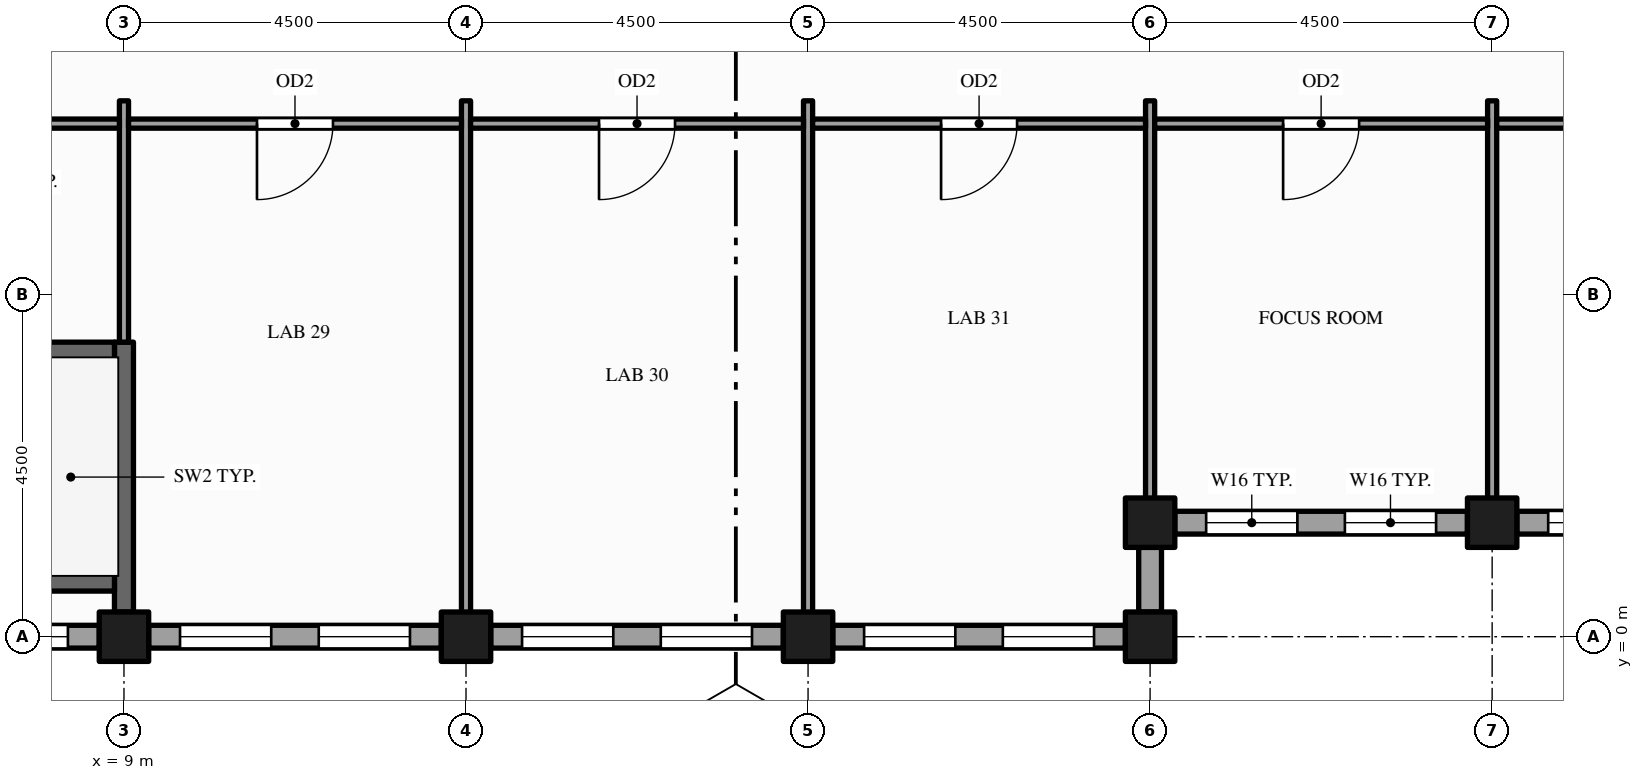
"""IFC4 building model, lengths in metres.
Left out: names, types, materials, properties, quantities, classifications, styles, units other than length and angle.
Written with IfcOpenShell. Run it as: python <this file> out.ifc"""

import sys

from ifc_helpers import new_model, si_unit, direction, frame, frame_2d, origin, origin_2d, place, context, subcontext, project, spatial, rectangle, hollow_rectangle, extrude, element, fill, save


model = new_model("IFC4")
c1 = context("Model", 3, precision=1e-05, world=origin(), true_north=direction((0.0, 1.0)))
c2 = subcontext(c1, "Body", "Model", "MODEL_VIEW")
j1 = project(units=[si_unit("LENGTHUNIT", "METRE"), si_unit("PLANEANGLEUNIT", "RADIAN")], contexts=[c1])
p1 = place(None, origin())
s1 = spatial("IfcSite", under=j1, at=p1, CompositionType="ELEMENT")
p2 = place(p1, origin())
s2 = spatial("IfcBuilding", under=s1, at=p2, CompositionType="ELEMENT")
p3 = place(p2, frame((0.0, 0.0, 269.0)))
s3 = spatial("IfcBuildingStorey", under=s2, at=p3, CompositionType="ELEMENT", Elevation=269.0)
for number, where, z_axis, x_axis in (
    (1, (9.0, 0.0, -0.15), (0.0, 0.0, 1.0), (1.0, 0.0, 0.0)),
    (2, (13.5, 0.0, -0.15), (0.0, 0.0, 1.0), (1.0, 0.0, 0.0)),
    (3, (18.0, 0.0, -0.15), (0.0, 0.0, 1.0), (1.0, 0.0, 0.0)),
    (4, (22.5, 0.0, -0.15), (0.0, 0.0, 1.0), (1.0, 0.0, 0.0)),
    (5, (22.5, 1.5, -0.15), (0.0, 0.0, 1.0), (1.0, 0.0, 0.0)),
    (6, (27.0, 1.5, -0.15), (0.0, 0.0, 1.0), (1.0, 0.0, 0.0)),
):
    element("IfcColumn", number, at=place(p3, frame(where, z_axis=z_axis, x_axis=x_axis)), inside=s3, PredefinedType="COLUMN", context=c2, shape_type="SweptSolid", body=[
        extrude(hollow_rectangle(XDim=0.65, YDim=0.65, WallThickness=0.032, at=origin_2d()), origin(), (0.0, 0.0, 1.0), 4.0),
    ])
p4 = place(p3, frame((22.5, 0.325, 0.0), z_axis=(0.0, 0.0, 1.0), x_axis=(0.0, 1.0, 0.0)))
e7 = element("IfcWall", 7, at=p4, inside=s3, PredefinedType="STANDARD", context=c2, shape_type="SweptSolid", body=[
    extrude(rectangle(XDim=0.85, YDim=0.3, at=frame_2d((0.425, 0.0))), origin(), (0.0, 0.0, 1.0), 3.162),
])
p5 = place(p3, frame((22.825, 1.5, 0.0), z_axis=(0.0, 0.0, 1.0), x_axis=(1.0, 0.0, 0.0)))
e8 = element("IfcWall", 8, at=p5, inside=s3, PredefinedType="STANDARD", context=c2, shape_type="SweptSolid", body=[
    extrude(rectangle(XDim=3.85, YDim=0.3, at=frame_2d((1.925, 0.0))), origin(), (0.0, 0.0, 1.0), 2.87),
])
p6 = place(p5, frame((0.413, 0.0, 0.9)))
e9 = element("IfcOpeningElement", 9, at=p6, cuts=e8, PredefinedType="OPENING", context=c2, shape_type="SweptSolid", body=[
    extrude(rectangle(XDim=1.2, YDim=1.75, at=frame_2d((0.6, 0.875))), frame((0.0, 0.16, 0.0), z_axis=(0.0, -1.0, 0.0), x_axis=(1.0, 0.0, 0.0)), (0.0, 0.0, 1.0), 0.32),
])
p7 = place(p5, frame((2.238, 0.0, 0.9)))
e10 = element("IfcOpeningElement", 10, at=p7, cuts=e8, PredefinedType="OPENING", context=c2, shape_type="SweptSolid", body=[
    extrude(rectangle(XDim=1.2, YDim=1.75, at=frame_2d((0.6, 0.875))), frame((0.0, 0.16, 0.0), z_axis=(0.0, -1.0, 0.0), x_axis=(1.0, 0.0, 0.0)), (0.0, 0.0, 1.0), 0.32),
])
p8 = place(p3, frame((27.325, 1.5, 0.0), z_axis=(0.0, 0.0, 1.0), x_axis=(1.0, 0.0, 0.0)))
e11 = element("IfcWall", 11, at=p8, inside=s3, PredefinedType="STANDARD", context=c2, shape_type="SweptSolid", body=[
    extrude(rectangle(XDim=3.85, YDim=0.3, at=frame_2d((1.925, 0.0))), origin(), (0.0, 0.0, 1.0), 2.87),
])
p9 = place(p8, frame((0.413, 0.0, 0.9)))
e12 = element("IfcOpeningElement", 12, at=p9, cuts=e11, PredefinedType="OPENING", context=c2, shape_type="SweptSolid", body=[
    extrude(rectangle(XDim=1.2, YDim=1.75, at=frame_2d((0.6, 0.875))), frame((0.0, 0.16, 0.0), z_axis=(0.0, -1.0, 0.0), x_axis=(1.0, 0.0, 0.0)), (0.0, 0.0, 1.0), 0.32),
])
p10 = place(p8, frame((2.238, 0.0, 0.9)))
e13 = element("IfcOpeningElement", 13, at=p10, cuts=e11, PredefinedType="OPENING", context=c2, shape_type="SweptSolid", body=[
    extrude(rectangle(XDim=1.2, YDim=1.75, at=frame_2d((0.6, 0.875))), frame((0.0, 0.16, 0.0), z_axis=(0.0, -1.0, 0.0), x_axis=(1.0, 0.0, 0.0)), (0.0, 0.0, 1.0), 0.32),
])
p11 = place(p3, frame((4.825, 0.0, 0.0), z_axis=(0.0, 0.0, 1.0), x_axis=(1.0, 0.0, 0.0)))
e14 = element("IfcWall", 14, at=p11, inside=s3, PredefinedType="STANDARD", context=c2, shape_type="SweptSolid", body=[
    extrude(rectangle(XDim=3.85, YDim=0.3, at=frame_2d((1.925, 0.0))), origin(), (0.0, 0.0, 1.0), 3.162),
])
p12 = place(p11, frame((0.413, 0.0, 0.9)))
e15 = element("IfcOpeningElement", 15, at=p12, cuts=e14, PredefinedType="OPENING", context=c2, shape_type="SweptSolid", body=[
    extrude(rectangle(XDim=1.2, YDim=2.0, at=frame_2d((0.6, 1.0))), frame((0.0, 0.16, 0.0), z_axis=(0.0, -1.0, 0.0), x_axis=(1.0, 0.0, 0.0)), (0.0, 0.0, 1.0), 0.32),
])
p13 = place(p11, frame((2.238, 0.0, 0.9)))
e16 = element("IfcOpeningElement", 16, at=p13, cuts=e14, PredefinedType="OPENING", context=c2, shape_type="SweptSolid", body=[
    extrude(rectangle(XDim=1.2, YDim=2.0, at=frame_2d((0.6, 1.0))), frame((0.0, 0.16, 0.0), z_axis=(0.0, -1.0, 0.0), x_axis=(1.0, 0.0, 0.0)), (0.0, 0.0, 1.0), 0.32),
])
p14 = place(p3, frame((9.325, 0.0, 0.0), z_axis=(0.0, 0.0, 1.0), x_axis=(1.0, 0.0, 0.0)))
e17 = element("IfcWall", 17, at=p14, inside=s3, PredefinedType="STANDARD", context=c2, shape_type="SweptSolid", body=[
    extrude(rectangle(XDim=3.85, YDim=0.3, at=frame_2d((1.925, 0.0))), origin(), (0.0, 0.0, 1.0), 2.87),
])
p15 = place(p14, frame((0.413, 0.0, 0.9)))
e18 = element("IfcOpeningElement", 18, at=p15, cuts=e17, PredefinedType="OPENING", context=c2, shape_type="SweptSolid", body=[
    extrude(rectangle(XDim=1.2, YDim=1.75, at=frame_2d((0.6, 0.875))), frame((0.0, 0.16, 0.0), z_axis=(0.0, -1.0, 0.0), x_axis=(1.0, 0.0, 0.0)), (0.0, 0.0, 1.0), 0.32),
])
p16 = place(p14, frame((2.238, 0.0, 0.9)))
e19 = element("IfcOpeningElement", 19, at=p16, cuts=e17, PredefinedType="OPENING", context=c2, shape_type="SweptSolid", body=[
    extrude(rectangle(XDim=1.2, YDim=1.75, at=frame_2d((0.6, 0.875))), frame((0.0, 0.16, 0.0), z_axis=(0.0, -1.0, 0.0), x_axis=(1.0, 0.0, 0.0)), (0.0, 0.0, 1.0), 0.32),
])
p17 = place(p3, frame((13.825, 0.0, 0.0), z_axis=(0.0, 0.0, 1.0), x_axis=(1.0, 0.0, 0.0)))
e20 = element("IfcWall", 20, at=p17, inside=s3, PredefinedType="STANDARD", context=c2, shape_type="SweptSolid", body=[
    extrude(rectangle(XDim=3.85, YDim=0.3, at=frame_2d((1.925, 0.0))), origin(), (0.0, 0.0, 1.0), 2.87),
])
p18 = place(p17, frame((0.413, 0.0, 0.9)))
e21 = element("IfcOpeningElement", 21, at=p18, cuts=e20, PredefinedType="OPENING", context=c2, shape_type="SweptSolid", body=[
    extrude(rectangle(XDim=1.2, YDim=1.75, at=frame_2d((0.6, 0.875))), frame((0.0, 0.16, 0.0), z_axis=(0.0, -1.0, 0.0), x_axis=(1.0, 0.0, 0.0)), (0.0, 0.0, 1.0), 0.32),
])
p19 = place(p17, frame((2.238, 0.0, 0.9)))
e22 = element("IfcOpeningElement", 22, at=p19, cuts=e20, PredefinedType="OPENING", context=c2, shape_type="SweptSolid", body=[
    extrude(rectangle(XDim=1.2, YDim=1.75, at=frame_2d((0.6, 0.875))), frame((0.0, 0.16, 0.0), z_axis=(0.0, -1.0, 0.0), x_axis=(1.0, 0.0, 0.0)), (0.0, 0.0, 1.0), 0.32),
])
p20 = place(p3, frame((18.325, 0.0, 0.0), z_axis=(0.0, 0.0, 1.0), x_axis=(1.0, 0.0, 0.0)))
e23 = element("IfcWall", 23, at=p20, inside=s3, PredefinedType="STANDARD", context=c2, shape_type="SweptSolid", body=[
    extrude(rectangle(XDim=3.85, YDim=0.3, at=frame_2d((1.925, 0.0))), origin(), (0.0, 0.0, 1.0), 2.87),
])
p21 = place(p20, frame((0.413, 0.0, 0.9)))
e24 = element("IfcOpeningElement", 24, at=p21, cuts=e23, PredefinedType="OPENING", context=c2, shape_type="SweptSolid", body=[
    extrude(rectangle(XDim=1.2, YDim=1.75, at=frame_2d((0.6, 0.875))), frame((0.0, 0.16, 0.0), z_axis=(0.0, -1.0, 0.0), x_axis=(1.0, 0.0, 0.0)), (0.0, 0.0, 1.0), 0.32),
])
p22 = place(p20, frame((2.238, 0.0, 0.9)))
e25 = element("IfcOpeningElement", 25, at=p22, cuts=e23, PredefinedType="OPENING", context=c2, shape_type="SweptSolid", body=[
    extrude(rectangle(XDim=1.2, YDim=1.75, at=frame_2d((0.6, 0.875))), frame((0.0, 0.16, 0.0), z_axis=(0.0, -1.0, 0.0), x_axis=(1.0, 0.0, 0.0)), (0.0, 0.0, 1.0), 0.32),
])
p23 = place(p3, frame((9.0, 0.325, 0.0), z_axis=(0.0, 0.0, 1.0), x_axis=(0.0, 1.0, 0.0)))
e26 = element("IfcWall", 26, at=p23, inside=s3, PredefinedType="SHEAR", context=c2, shape_type="SweptSolid", body=[
    extrude(rectangle(XDim=3.55, YDim=0.25, at=frame_2d((1.775, 0.0))), origin(), (0.0, 0.0, 1.0), 3.85),
])
p24 = place(p3, frame((9.0, 3.875, 0.0), z_axis=(0.0, 0.0, 1.0), x_axis=(0.0, 1.0, 0.0)))
e27 = element("IfcWall", 27, at=p24, inside=s3, PredefinedType="PARTITIONING", context=c2, shape_type="SweptSolid", body=[
    extrude(rectangle(XDim=3.175, YDim=0.12, at=frame_2d((1.587, 0.0))), origin(), (0.0, 0.0, 1.0), 2.87),
])
for number, where, z_axis, x_axis in (
    (28, (13.5, 0.15, 0.0), (0.0, 0.0, 1.0), (0.0, 1.0, 0.0)),
    (29, (18.0, 0.15, 0.0), (0.0, 0.0, 1.0), (0.0, 1.0, 0.0)),
):
    element("IfcWall", number, at=place(p3, frame(where, z_axis=z_axis, x_axis=x_axis)), inside=s3, PredefinedType="PARTITIONING", context=c2, shape_type="SweptSolid", body=[
        extrude(rectangle(XDim=6.9, YDim=0.12, at=frame_2d((3.45, 0.0))), origin(), (0.0, 0.0, 1.0), 2.87),
    ])
for number, where, z_axis, x_axis in (
    (30, (22.5, 1.65, 0.0), (0.0, 0.0, 1.0), (0.0, 1.0, 0.0)),
    (31, (27.0, 1.65, 0.0), (0.0, 0.0, 1.0), (0.0, 1.0, 0.0)),
):
    element("IfcWall", number, at=place(p3, frame(where, z_axis=z_axis, x_axis=x_axis)), inside=s3, PredefinedType="PARTITIONING", context=c2, shape_type="SweptSolid", body=[
        extrude(rectangle(XDim=5.4, YDim=0.12, at=frame_2d((2.7, 0.0))), origin(), (0.0, 0.0, 1.0), 2.87),
    ])
p25 = place(p3, frame((0.85, 0.725, 0.0), z_axis=(0.0, 0.0, 1.0), x_axis=(1.0, 0.0, 0.0)))
e32 = element("IfcWall", 32, at=p25, inside=s3, PredefinedType="SHEAR", context=c2, shape_type="SweptSolid", body=[
    extrude(rectangle(XDim=8.025, YDim=0.25, at=frame_2d((4.012, 0.0))), origin(), (0.0, 0.0, 1.0), 3.85),
])
p26 = place(p3, frame((0.85, 3.75, 0.0), z_axis=(0.0, 0.0, 1.0), x_axis=(1.0, 0.0, 0.0)))
e33 = element("IfcWall", 33, at=p26, inside=s3, PredefinedType="SHEAR", context=c2, shape_type="SweptSolid", body=[
    extrude(rectangle(XDim=8.025, YDim=0.25, at=frame_2d((4.012, 0.0))), origin(), (0.0, 0.0, 1.0), 3.85),
])
p27 = place(p26, frame((0.15, 0.0, 0.0)))
e34 = element("IfcOpeningElement", 34, at=p27, cuts=e33, PredefinedType="OPENING", context=c2, shape_type="SweptSolid", body=[
    extrude(rectangle(XDim=1.1, YDim=2.1, at=frame_2d((0.55, 1.05))), frame((0.0, 0.135, 0.0), z_axis=(0.0, -1.0, 0.0), x_axis=(1.0, 0.0, 0.0)), (0.0, 0.0, 1.0), 0.27),
])
p28 = place(p3, frame((0.15, 6.75, 0.0), z_axis=(0.0, 0.0, 1.0), x_axis=(1.0, 0.0, 0.0)))
e35 = element("IfcWall", 35, at=p28, inside=s3, PredefinedType="PARTITIONING", context=c2, shape_type="SweptSolid", body=[
    extrude(rectangle(XDim=8.79, YDim=0.12, at=frame_2d((4.395, 0.0))), origin(), (0.0, 0.0, 1.0), 2.87),
])
p29 = place(p28, frame((3.805, 0.0, 0.0)))
e36 = element("IfcOpeningElement", 36, at=p29, cuts=e35, PredefinedType="OPENING", context=c2, shape_type="SweptSolid", body=[
    extrude(rectangle(XDim=1.2, YDim=2.1, at=frame_2d((0.6, 1.05))), frame((0.0, 0.07, 0.0), z_axis=(0.0, -1.0, 0.0), x_axis=(1.0, 0.0, 0.0)), (0.0, 0.0, 1.0), 0.14),
])
p30 = place(p3, frame((9.06, 6.75, 0.0), z_axis=(0.0, 0.0, 1.0), x_axis=(1.0, 0.0, 0.0)))
e37 = element("IfcWall", 37, at=p30, inside=s3, PredefinedType="PARTITIONING", context=c2, shape_type="SweptSolid", body=[
    extrude(rectangle(XDim=4.38, YDim=0.12, at=frame_2d((2.19, 0.0))), origin(), (0.0, 0.0, 1.0), 2.87),
])
p31 = place(p30, frame((1.69, 0.0, 0.0)))
e38 = element("IfcOpeningElement", 38, at=p31, cuts=e37, PredefinedType="OPENING", context=c2, shape_type="SweptSolid", body=[
    extrude(rectangle(XDim=1.0, YDim=2.1, at=frame_2d((0.5, 1.05))), frame((0.0, 0.07, 0.0), z_axis=(0.0, -1.0, 0.0), x_axis=(1.0, 0.0, 0.0)), (0.0, 0.0, 1.0), 0.14),
])
p32 = place(p3, frame((13.56, 6.75, 0.0), z_axis=(0.0, 0.0, 1.0), x_axis=(1.0, 0.0, 0.0)))
e39 = element("IfcWall", 39, at=p32, inside=s3, PredefinedType="PARTITIONING", context=c2, shape_type="SweptSolid", body=[
    extrude(rectangle(XDim=4.38, YDim=0.12, at=frame_2d((2.19, 0.0))), origin(), (0.0, 0.0, 1.0), 2.87),
])
p33 = place(p32, frame((1.69, 0.0, 0.0)))
e40 = element("IfcOpeningElement", 40, at=p33, cuts=e39, PredefinedType="OPENING", context=c2, shape_type="SweptSolid", body=[
    extrude(rectangle(XDim=1.0, YDim=2.1, at=frame_2d((0.5, 1.05))), frame((0.0, 0.07, 0.0), z_axis=(0.0, -1.0, 0.0), x_axis=(1.0, 0.0, 0.0)), (0.0, 0.0, 1.0), 0.14),
])
p34 = place(p3, frame((18.06, 6.75, 0.0), z_axis=(0.0, 0.0, 1.0), x_axis=(1.0, 0.0, 0.0)))
e41 = element("IfcWall", 41, at=p34, inside=s3, PredefinedType="PARTITIONING", context=c2, shape_type="SweptSolid", body=[
    extrude(rectangle(XDim=4.38, YDim=0.12, at=frame_2d((2.19, 0.0))), origin(), (0.0, 0.0, 1.0), 2.87),
])
p35 = place(p34, frame((1.69, 0.0, 0.0)))
e42 = element("IfcOpeningElement", 42, at=p35, cuts=e41, PredefinedType="OPENING", context=c2, shape_type="SweptSolid", body=[
    extrude(rectangle(XDim=1.0, YDim=2.1, at=frame_2d((0.5, 1.05))), frame((0.0, 0.07, 0.0), z_axis=(0.0, -1.0, 0.0), x_axis=(1.0, 0.0, 0.0)), (0.0, 0.0, 1.0), 0.14),
])
p36 = place(p3, frame((22.56, 6.75, 0.0), z_axis=(0.0, 0.0, 1.0), x_axis=(1.0, 0.0, 0.0)))
e43 = element("IfcWall", 43, at=p36, inside=s3, PredefinedType="PARTITIONING", context=c2, shape_type="SweptSolid", body=[
    extrude(rectangle(XDim=4.38, YDim=0.12, at=frame_2d((2.19, 0.0))), origin(), (0.0, 0.0, 1.0), 2.87),
])
p37 = place(p36, frame((1.69, 0.0, 0.0)))
e44 = element("IfcOpeningElement", 44, at=p37, cuts=e43, PredefinedType="OPENING", context=c2, shape_type="SweptSolid", body=[
    extrude(rectangle(XDim=1.0, YDim=2.1, at=frame_2d((0.5, 1.05))), frame((0.0, 0.07, 0.0), z_axis=(0.0, -1.0, 0.0), x_axis=(1.0, 0.0, 0.0)), (0.0, 0.0, 1.0), 0.14),
])
p38 = place(p3, frame((27.06, 6.75, 0.0), z_axis=(0.0, 0.0, 1.0), x_axis=(1.0, 0.0, 0.0)))
e45 = element("IfcWall", 45, at=p38, inside=s3, PredefinedType="PARTITIONING", context=c2, shape_type="SweptSolid", body=[
    extrude(rectangle(XDim=6.63, YDim=0.12, at=frame_2d((3.315, 0.0))), origin(), (0.0, 0.0, 1.0), 2.87),
])
p39 = place(p38, frame((2.815, 0.0, 0.0)))
e46 = element("IfcOpeningElement", 46, at=p39, cuts=e45, PredefinedType="OPENING", context=c2, shape_type="SweptSolid", body=[
    extrude(rectangle(XDim=1.0, YDim=2.1, at=frame_2d((0.5, 1.05))), frame((0.0, 0.07, 0.0), z_axis=(0.0, -1.0, 0.0), x_axis=(1.0, 0.0, 0.0)), (0.0, 0.0, 1.0), 0.14),
])
p40 = place(p6, origin())
e47 = element("IfcWindow", 47, at=p40, inside=s3, PartitioningType="SINGLE_PANEL", PredefinedType="WINDOW", context=c2, shape_type="SweptSolid", body=[
    extrude(rectangle(XDim=1.2, YDim=1.75, at=frame_2d((0.6, 0.875))), frame((0.0, 0.03, 0.0), z_axis=(0.0, -1.0, 0.0), x_axis=(1.0, 0.0, 0.0)), (0.0, 0.0, 1.0), 0.06),
])
fill(e9, e47)
p41 = place(p7, origin())
e48 = element("IfcWindow", 48, at=p41, inside=s3, PartitioningType="SINGLE_PANEL", PredefinedType="WINDOW", context=c2, shape_type="SweptSolid", body=[
    extrude(rectangle(XDim=1.2, YDim=1.75, at=frame_2d((0.6, 0.875))), frame((0.0, 0.03, 0.0), z_axis=(0.0, -1.0, 0.0), x_axis=(1.0, 0.0, 0.0)), (0.0, 0.0, 1.0), 0.06),
])
fill(e10, e48)
p42 = place(p9, origin())
e49 = element("IfcWindow", 49, at=p42, inside=s3, PartitioningType="SINGLE_PANEL", PredefinedType="WINDOW", context=c2, shape_type="SweptSolid", body=[
    extrude(rectangle(XDim=1.2, YDim=1.75, at=frame_2d((0.6, 0.875))), frame((0.0, 0.03, 0.0), z_axis=(0.0, -1.0, 0.0), x_axis=(1.0, 0.0, 0.0)), (0.0, 0.0, 1.0), 0.06),
])
fill(e12, e49)
p43 = place(p13, origin())
e50 = element("IfcWindow", 50, at=p43, inside=s3, PartitioningType="SINGLE_PANEL", PredefinedType="WINDOW", context=c2, shape_type="SweptSolid", body=[
    extrude(rectangle(XDim=1.2, YDim=2.0, at=frame_2d((0.6, 1.0))), frame((0.0, 0.03, 0.0), z_axis=(0.0, -1.0, 0.0), x_axis=(1.0, 0.0, 0.0)), (0.0, 0.0, 1.0), 0.06),
])
fill(e16, e50)
p44 = place(p15, origin())
e51 = element("IfcWindow", 51, at=p44, inside=s3, PartitioningType="SINGLE_PANEL", PredefinedType="WINDOW", context=c2, shape_type="SweptSolid", body=[
    extrude(rectangle(XDim=1.2, YDim=1.75, at=frame_2d((0.6, 0.875))), frame((0.0, 0.03, 0.0), z_axis=(0.0, -1.0, 0.0), x_axis=(1.0, 0.0, 0.0)), (0.0, 0.0, 1.0), 0.06),
])
fill(e18, e51)
p45 = place(p16, origin())
e52 = element("IfcWindow", 52, at=p45, inside=s3, PartitioningType="SINGLE_PANEL", PredefinedType="WINDOW", context=c2, shape_type="SweptSolid", body=[
    extrude(rectangle(XDim=1.2, YDim=1.75, at=frame_2d((0.6, 0.875))), frame((0.0, 0.03, 0.0), z_axis=(0.0, -1.0, 0.0), x_axis=(1.0, 0.0, 0.0)), (0.0, 0.0, 1.0), 0.06),
])
fill(e19, e52)
p46 = place(p18, origin())
e53 = element("IfcWindow", 53, at=p46, inside=s3, PartitioningType="SINGLE_PANEL", PredefinedType="WINDOW", context=c2, shape_type="SweptSolid", body=[
    extrude(rectangle(XDim=1.2, YDim=1.75, at=frame_2d((0.6, 0.875))), frame((0.0, 0.03, 0.0), z_axis=(0.0, -1.0, 0.0), x_axis=(1.0, 0.0, 0.0)), (0.0, 0.0, 1.0), 0.06),
])
fill(e21, e53)
p47 = place(p19, origin())
e54 = element("IfcWindow", 54, at=p47, inside=s3, PartitioningType="SINGLE_PANEL", PredefinedType="WINDOW", context=c2, shape_type="SweptSolid", body=[
    extrude(rectangle(XDim=1.2, YDim=1.75, at=frame_2d((0.6, 0.875))), frame((0.0, 0.03, 0.0), z_axis=(0.0, -1.0, 0.0), x_axis=(1.0, 0.0, 0.0)), (0.0, 0.0, 1.0), 0.06),
])
fill(e22, e54)
p48 = place(p21, origin())
e55 = element("IfcWindow", 55, at=p48, inside=s3, PartitioningType="SINGLE_PANEL", PredefinedType="WINDOW", context=c2, shape_type="SweptSolid", body=[
    extrude(rectangle(XDim=1.2, YDim=1.75, at=frame_2d((0.6, 0.875))), frame((0.0, 0.03, 0.0), z_axis=(0.0, -1.0, 0.0), x_axis=(1.0, 0.0, 0.0)), (0.0, 0.0, 1.0), 0.06),
])
fill(e24, e55)
p49 = place(p22, origin())
e56 = element("IfcWindow", 56, at=p49, inside=s3, PartitioningType="SINGLE_PANEL", PredefinedType="WINDOW", context=c2, shape_type="SweptSolid", body=[
    extrude(rectangle(XDim=1.2, YDim=1.75, at=frame_2d((0.6, 0.875))), frame((0.0, 0.03, 0.0), z_axis=(0.0, -1.0, 0.0), x_axis=(1.0, 0.0, 0.0)), (0.0, 0.0, 1.0), 0.06),
])
fill(e25, e56)
p50 = place(p31, origin())
e57 = element("IfcDoor", 57, at=p50, inside=s3, OperationType="SINGLE_SWING_LEFT", PredefinedType="DOOR", context=c2, shape_type="SweptSolid", body=[
    extrude(rectangle(XDim=1.0, YDim=2.1, at=frame_2d((0.5, 1.05))), frame((0.0, 0.025, 0.0), z_axis=(0.0, -1.0, 0.0), x_axis=(1.0, 0.0, 0.0)), (0.0, 0.0, 1.0), 0.05),
])
fill(e38, e57)
p51 = place(p33, origin())
e58 = element("IfcDoor", 58, at=p51, inside=s3, OperationType="SINGLE_SWING_LEFT", PredefinedType="DOOR", context=c2, shape_type="SweptSolid", body=[
    extrude(rectangle(XDim=1.0, YDim=2.1, at=frame_2d((0.5, 1.05))), frame((0.0, 0.025, 0.0), z_axis=(0.0, -1.0, 0.0), x_axis=(1.0, 0.0, 0.0)), (0.0, 0.0, 1.0), 0.05),
])
fill(e40, e58)
p52 = place(p35, origin())
e59 = element("IfcDoor", 59, at=p52, inside=s3, OperationType="SINGLE_SWING_LEFT", PredefinedType="DOOR", context=c2, shape_type="SweptSolid", body=[
    extrude(rectangle(XDim=1.0, YDim=2.1, at=frame_2d((0.5, 1.05))), frame((0.0, 0.025, 0.0), z_axis=(0.0, -1.0, 0.0), x_axis=(1.0, 0.0, 0.0)), (0.0, 0.0, 1.0), 0.05),
])
fill(e42, e59)
p53 = place(p37, origin())
e60 = element("IfcDoor", 60, at=p53, inside=s3, OperationType="SINGLE_SWING_LEFT", PredefinedType="DOOR", context=c2, shape_type="SweptSolid", body=[
    extrude(rectangle(XDim=1.0, YDim=2.1, at=frame_2d((0.5, 1.05))), frame((0.0, 0.025, 0.0), z_axis=(0.0, -1.0, 0.0), x_axis=(1.0, 0.0, 0.0)), (0.0, 0.0, 1.0), 0.05),
])
fill(e44, e60)
save(model, sys.argv[1])
